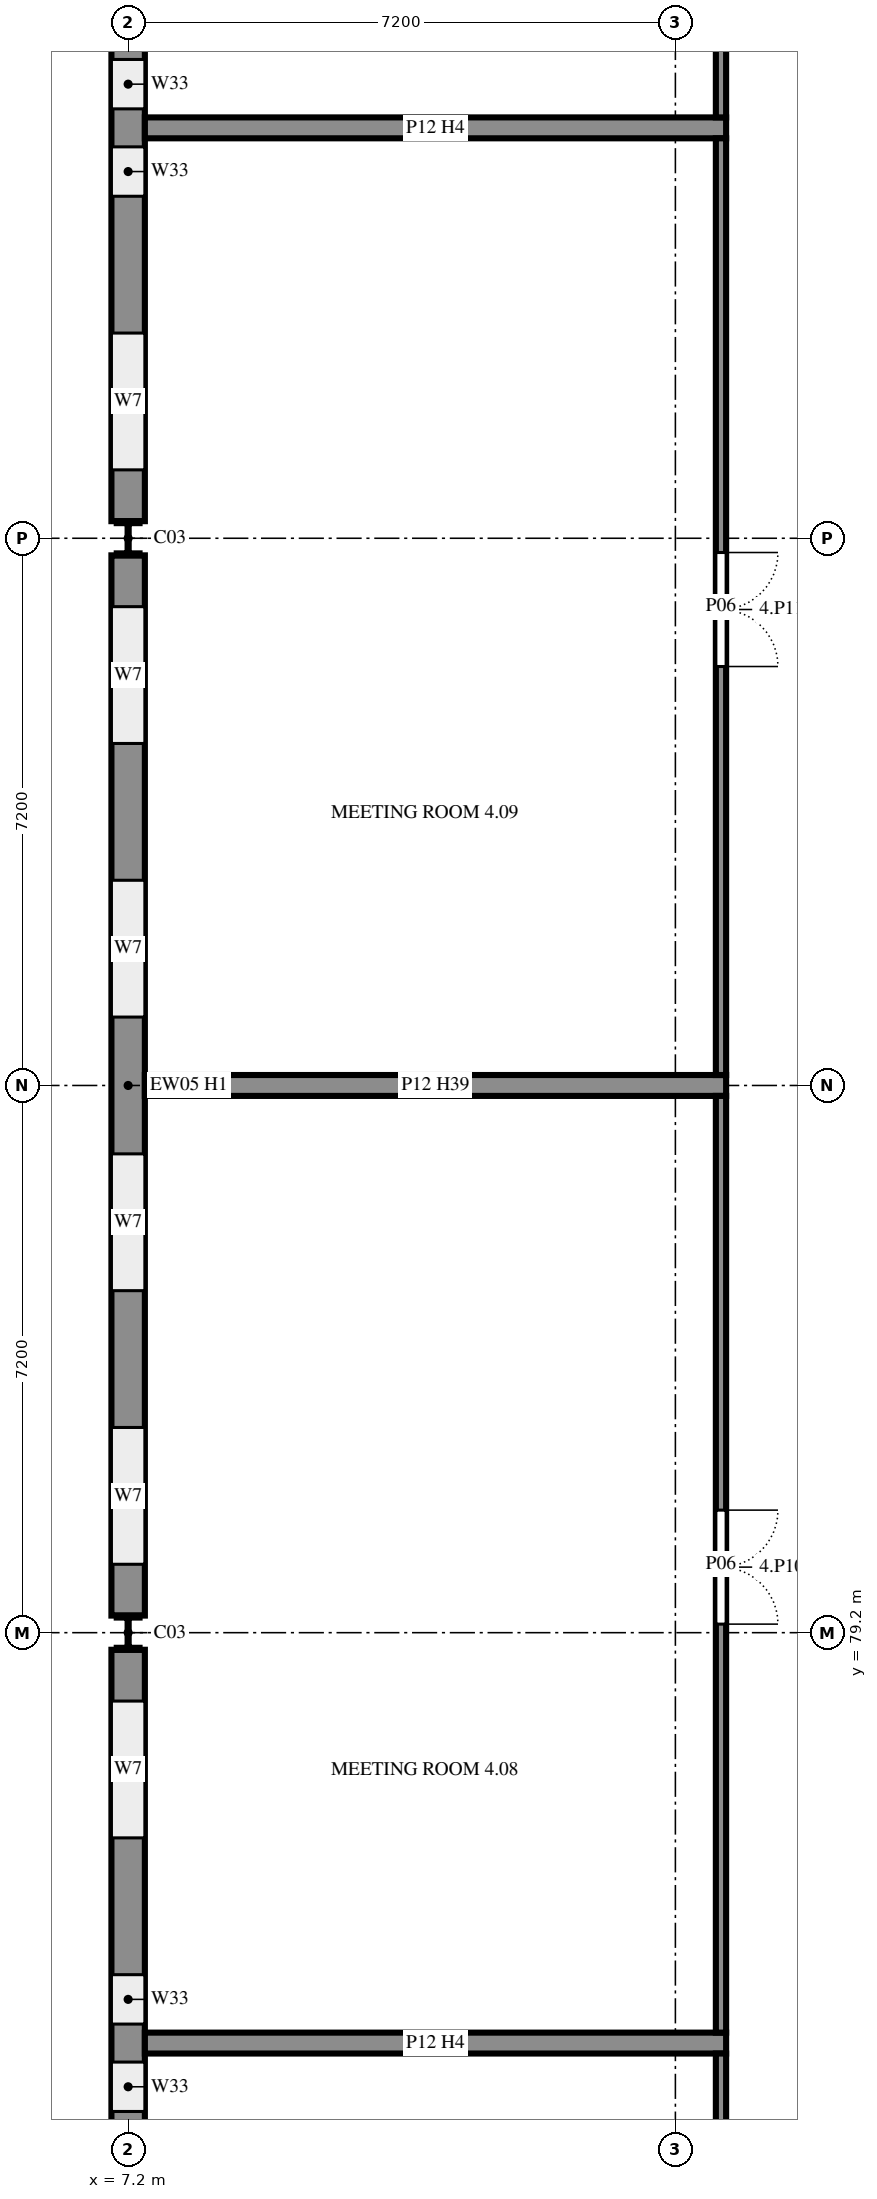
"""IFC4 building model, lengths in metres.
Left out: names, types, materials, properties, quantities, classifications, styles, units other than length and angle.
Written with IfcOpenShell. Run it as: python <this file> out.ifc"""

import sys

from ifc_helpers import new_model, si_unit, direction, frame, frame_2d, origin, origin_2d, place, context, subcontext, project, spatial, rectangle, i_section, extrude, element, fill, save


model = new_model("IFC4")
c1 = context("Model", 3, precision=1e-05, world=origin(), true_north=direction((0.0, 1.0)))
c2 = subcontext(c1, "Body", "Model", "MODEL_VIEW")
j1 = project(units=[si_unit("LENGTHUNIT", "METRE"), si_unit("PLANEANGLEUNIT", "RADIAN")], contexts=[c1])
p1 = place(None, origin())
s1 = spatial("IfcSite", under=j1, at=p1, CompositionType="ELEMENT")
p2 = place(p1, origin())
s2 = spatial("IfcBuilding", under=s1, at=p2, CompositionType="ELEMENT")
p3 = place(p2, frame((0.0, 0.0, 14.4)))
s3 = spatial("IfcBuildingStorey", under=s2, at=p3, CompositionType="ELEMENT", Elevation=14.4)
for number, where, z_axis, x_axis in (
    (1, (7.2, 79.2, 0.0), (0.0, 0.0, 1.0), (1.0, 0.0, 0.0)),
    (2, (7.2, 93.6, 0.0), (0.0, 0.0, 1.0), (1.0, 0.0, 0.0)),
):
    element("IfcColumn", number, at=place(p3, frame(where, z_axis=z_axis, x_axis=x_axis)), inside=s3, PredefinedType="COLUMN", context=c2, shape_type="SweptSolid", body=[
        extrude(i_section(OverallWidth=0.3, OverallDepth=0.45, WebThickness=0.014, FlangeThickness=0.026, FilletRadius=0.027, at=origin_2d()), origin(), (0.0, 0.0, 1.0), 3.6),
    ])
p4 = place(p3, frame((7.2, 107.775, 0.0), z_axis=(0.0, 0.0, 1.0), x_axis=(0.0, -1.0, 0.0)))
e3 = element("IfcWall", 3, at=p4, inside=s3, PredefinedType="SOLIDWALL", context=c2, shape_type="SweptSolid", body=[
    extrude(rectangle(XDim=13.95, YDim=0.44, at=frame_2d((6.975, 0.0))), origin(), (0.0, 0.0, 1.0), 2.82),
])
p5 = place(p4, frame((11.475, 0.0, 0.75)))
e4 = element("IfcOpeningElement", 4, at=p5, cuts=e3, PredefinedType="OPENING", context=c2, shape_type="SweptSolid", body=[
    extrude(rectangle(XDim=1.8, YDim=1.8, at=frame_2d((0.9, 0.9))), frame((0.0, 0.23, 0.0), z_axis=(0.0, -1.0, 0.0), x_axis=(1.0, 0.0, 0.0)), (0.0, 0.0, 1.0), 0.46),
])
p6 = place(p4, frame((7.875, 0.0, 0.75)))
e5 = element("IfcOpeningElement", 5, at=p6, cuts=e3, PredefinedType="OPENING", context=c2, shape_type="SweptSolid", body=[
    extrude(rectangle(XDim=0.65, YDim=1.8, at=frame_2d((0.325, 0.9))), frame((0.0, 0.23, 0.0), z_axis=(0.0, -1.0, 0.0), x_axis=(1.0, 0.0, 0.0)), (0.0, 0.0, 1.0), 0.46),
])
p7 = place(p4, frame((9.025, 0.0, 0.75)))
e6 = element("IfcOpeningElement", 6, at=p7, cuts=e3, PredefinedType="OPENING", context=c2, shape_type="SweptSolid", body=[
    extrude(rectangle(XDim=0.65, YDim=1.8, at=frame_2d((0.325, 0.9))), frame((0.0, 0.23, 0.0), z_axis=(0.0, -1.0, 0.0), x_axis=(1.0, 0.0, 0.0)), (0.0, 0.0, 1.0), 0.46),
])
p8 = place(p4, frame((4.275, 0.0, 0.75)))
e7 = element("IfcOpeningElement", 7, at=p8, cuts=e3, PredefinedType="OPENING", context=c2, shape_type="SweptSolid", body=[
    extrude(rectangle(XDim=1.8, YDim=1.8, at=frame_2d((0.9, 0.9))), frame((0.0, 0.23, 0.0), z_axis=(0.0, -1.0, 0.0), x_axis=(1.0, 0.0, 0.0)), (0.0, 0.0, 1.0), 0.46),
])
p9 = place(p4, frame((0.675, 0.0, 0.75)))
e8 = element("IfcOpeningElement", 8, at=p9, cuts=e3, PredefinedType="OPENING", context=c2, shape_type="SweptSolid", body=[
    extrude(rectangle(XDim=1.8, YDim=1.8, at=frame_2d((0.9, 0.9))), frame((0.0, 0.23, 0.0), z_axis=(0.0, -1.0, 0.0), x_axis=(1.0, 0.0, 0.0)), (0.0, 0.0, 1.0), 0.46),
])
p10 = place(p3, frame((7.2, 93.375, 0.0), z_axis=(0.0, 0.0, 1.0), x_axis=(0.0, -1.0, 0.0)))
e9 = element("IfcWall", 9, at=p10, inside=s3, PredefinedType="SOLIDWALL", context=c2, shape_type="SweptSolid", body=[
    extrude(rectangle(XDim=13.95, YDim=0.44, at=frame_2d((6.975, 0.0))), origin(), (0.0, 0.0, 1.0), 2.82),
])
p11 = place(p10, frame((11.475, 0.0, 0.75)))
e10 = element("IfcOpeningElement", 10, at=p11, cuts=e9, PredefinedType="OPENING", context=c2, shape_type="SweptSolid", body=[
    extrude(rectangle(XDim=1.8, YDim=1.8, at=frame_2d((0.9, 0.9))), frame((0.0, 0.23, 0.0), z_axis=(0.0, -1.0, 0.0), x_axis=(1.0, 0.0, 0.0)), (0.0, 0.0, 1.0), 0.46),
])
p12 = place(p10, frame((7.875, 0.0, 0.75)))
e11 = element("IfcOpeningElement", 11, at=p12, cuts=e9, PredefinedType="OPENING", context=c2, shape_type="SweptSolid", body=[
    extrude(rectangle(XDim=1.8, YDim=1.8, at=frame_2d((0.9, 0.9))), frame((0.0, 0.23, 0.0), z_axis=(0.0, -1.0, 0.0), x_axis=(1.0, 0.0, 0.0)), (0.0, 0.0, 1.0), 0.46),
])
p13 = place(p10, frame((4.275, 0.0, 0.75)))
e12 = element("IfcOpeningElement", 12, at=p13, cuts=e9, PredefinedType="OPENING", context=c2, shape_type="SweptSolid", body=[
    extrude(rectangle(XDim=1.8, YDim=1.8, at=frame_2d((0.9, 0.9))), frame((0.0, 0.23, 0.0), z_axis=(0.0, -1.0, 0.0), x_axis=(1.0, 0.0, 0.0)), (0.0, 0.0, 1.0), 0.46),
])
p14 = place(p10, frame((0.675, 0.0, 0.75)))
e13 = element("IfcOpeningElement", 13, at=p14, cuts=e9, PredefinedType="OPENING", context=c2, shape_type="SweptSolid", body=[
    extrude(rectangle(XDim=1.8, YDim=1.8, at=frame_2d((0.9, 0.9))), frame((0.0, 0.23, 0.0), z_axis=(0.0, -1.0, 0.0), x_axis=(1.0, 0.0, 0.0)), (0.0, 0.0, 1.0), 0.46),
])
p15 = place(p3, frame((7.2, 78.975, 0.0), z_axis=(0.0, 0.0, 1.0), x_axis=(0.0, -1.0, 0.0)))
e14 = element("IfcWall", 14, at=p15, inside=s3, PredefinedType="SOLIDWALL", context=c2, shape_type="SweptSolid", body=[
    extrude(rectangle(XDim=13.95, YDim=0.44, at=frame_2d((6.975, 0.0))), origin(), (0.0, 0.0, 1.0), 2.82),
])
p16 = place(p15, frame((11.475, 0.0, 0.75)))
e15 = element("IfcOpeningElement", 15, at=p16, cuts=e14, PredefinedType="OPENING", context=c2, shape_type="SweptSolid", body=[
    extrude(rectangle(XDim=1.8, YDim=1.8, at=frame_2d((0.9, 0.9))), frame((0.0, 0.23, 0.0), z_axis=(0.0, -1.0, 0.0), x_axis=(1.0, 0.0, 0.0)), (0.0, 0.0, 1.0), 0.46),
])
p17 = place(p15, frame((7.875, 0.0, 0.75)))
e16 = element("IfcOpeningElement", 16, at=p17, cuts=e14, PredefinedType="OPENING", context=c2, shape_type="SweptSolid", body=[
    extrude(rectangle(XDim=1.8, YDim=1.8, at=frame_2d((0.9, 0.9))), frame((0.0, 0.23, 0.0), z_axis=(0.0, -1.0, 0.0), x_axis=(1.0, 0.0, 0.0)), (0.0, 0.0, 1.0), 0.46),
])
p18 = place(p15, frame((4.275, 0.0, 0.75)))
e17 = element("IfcOpeningElement", 17, at=p18, cuts=e14, PredefinedType="OPENING", context=c2, shape_type="SweptSolid", body=[
    extrude(rectangle(XDim=0.65, YDim=1.8, at=frame_2d((0.325, 0.9))), frame((0.0, 0.23, 0.0), z_axis=(0.0, -1.0, 0.0), x_axis=(1.0, 0.0, 0.0)), (0.0, 0.0, 1.0), 0.46),
])
p19 = place(p15, frame((5.425, 0.0, 0.75)))
e18 = element("IfcOpeningElement", 18, at=p19, cuts=e14, PredefinedType="OPENING", context=c2, shape_type="SweptSolid", body=[
    extrude(rectangle(XDim=0.65, YDim=1.8, at=frame_2d((0.325, 0.9))), frame((0.0, 0.23, 0.0), z_axis=(0.0, -1.0, 0.0), x_axis=(1.0, 0.0, 0.0)), (0.0, 0.0, 1.0), 0.46),
])
p20 = place(p15, frame((0.675, 0.0, 0.75)))
e19 = element("IfcOpeningElement", 19, at=p20, cuts=e14, PredefinedType="OPENING", context=c2, shape_type="SweptSolid", body=[
    extrude(rectangle(XDim=1.8, YDim=1.8, at=frame_2d((0.9, 0.9))), frame((0.0, 0.23, 0.0), z_axis=(0.0, -1.0, 0.0), x_axis=(1.0, 0.0, 0.0)), (0.0, 0.0, 1.0), 0.46),
])
p21 = place(p3, frame((7.42, 73.8, 0.0), z_axis=(0.0, 0.0, 1.0), x_axis=(1.0, 0.0, 0.0)))
e20 = element("IfcWall", 20, at=p21, inside=s3, PredefinedType="PARTITIONING", context=c2, shape_type="SweptSolid", body=[
    extrude(rectangle(XDim=7.647, YDim=0.275, at=frame_2d((3.824, 0.0))), origin(), (0.0, 0.0, 1.0), 3.42),
])
p22 = place(p3, frame((15.0, 73.663, 0.0), z_axis=(0.0, 0.0, 1.0), x_axis=(0.0, -1.0, 0.0)))
e21 = element("IfcWall", 21, at=p22, inside=s3, PredefinedType="PARTITIONING", context=c2, shape_type="SweptSolid", body=[
    extrude(rectangle(XDim=8.795, YDim=0.135, at=frame_2d((4.397, 0.0))), origin(), (0.0, 0.0, 1.0), 3.42),
])
p23 = place(p22, frame((3.65, 0.0, 0.0)))
e22 = element("IfcOpeningElement", 22, at=p23, cuts=e21, PredefinedType="OPENING", context=c2, shape_type="SweptSolid", body=[
    extrude(rectangle(XDim=1.5, YDim=2.1, at=frame_2d((0.75, 1.05))), frame((0.0, 0.077, 0.0), z_axis=(0.0, -1.0, 0.0), x_axis=(1.0, 0.0, 0.0)), (0.0, 0.0, 1.0), 0.155),
])
p24 = place(p3, frame((7.42, 86.4, 0.0), z_axis=(0.0, 0.0, 1.0), x_axis=(1.0, 0.0, 0.0)))
e23 = element("IfcWall", 23, at=p24, inside=s3, PredefinedType="PARTITIONING", context=c2, shape_type="SweptSolid", body=[
    extrude(rectangle(XDim=7.647, YDim=0.275, at=frame_2d((3.824, 0.0))), origin(), (0.0, 0.0, 1.0), 2.969),
])
p25 = place(p3, frame((15.0, 86.262, 0.0), z_axis=(0.0, 0.0, 1.0), x_axis=(0.0, -1.0, 0.0)))
e24 = element("IfcWall", 24, at=p25, inside=s3, PredefinedType="PARTITIONING", context=c2, shape_type="SweptSolid", body=[
    extrude(rectangle(XDim=12.325, YDim=0.135, at=frame_2d((6.163, 0.0))), origin(), (0.0, 0.0, 1.0), 3.42),
])
p26 = place(p25, frame((5.45, 0.0, 0.0)))
e25 = element("IfcOpeningElement", 25, at=p26, cuts=e24, PredefinedType="OPENING", context=c2, shape_type="SweptSolid", body=[
    extrude(rectangle(XDim=1.5, YDim=2.1, at=frame_2d((0.75, 1.05))), frame((0.0, 0.077, 0.0), z_axis=(0.0, -1.0, 0.0), x_axis=(1.0, 0.0, 0.0)), (0.0, 0.0, 1.0), 0.155),
])
p27 = place(p3, frame((7.42, 99.0, 0.0), z_axis=(0.0, 0.0, 1.0), x_axis=(1.0, 0.0, 0.0)))
e26 = element("IfcWall", 26, at=p27, inside=s3, PredefinedType="PARTITIONING", context=c2, shape_type="SweptSolid", body=[
    extrude(rectangle(XDim=7.647, YDim=0.275, at=frame_2d((3.824, 0.0))), origin(), (0.0, 0.0, 1.0), 3.42),
])
p28 = place(p3, frame((15.0, 98.863, 0.0), z_axis=(0.0, 0.0, 1.0), x_axis=(0.0, -1.0, 0.0)))
e27 = element("IfcWall", 27, at=p28, inside=s3, PredefinedType="PARTITIONING", context=c2, shape_type="SweptSolid", body=[
    extrude(rectangle(XDim=12.325, YDim=0.135, at=frame_2d((6.163, 0.0))), origin(), (0.0, 0.0, 1.0), 3.42),
])
p29 = place(p28, frame((5.45, 0.0, 0.0)))
e28 = element("IfcOpeningElement", 28, at=p29, cuts=e27, PredefinedType="OPENING", context=c2, shape_type="SweptSolid", body=[
    extrude(rectangle(XDim=1.5, YDim=2.1, at=frame_2d((0.75, 1.05))), frame((0.0, 0.077, 0.0), z_axis=(0.0, -1.0, 0.0), x_axis=(1.0, 0.0, 0.0)), (0.0, 0.0, 1.0), 0.155),
])
p30 = place(p3, frame((15.0, 107.933, 0.0), z_axis=(0.0, 0.0, 1.0), x_axis=(0.0, -1.0, 0.0)))
e29 = element("IfcWall", 29, at=p30, inside=s3, PredefinedType="PARTITIONING", context=c2, shape_type="SweptSolid", body=[
    extrude(rectangle(XDim=8.795, YDim=0.135, at=frame_2d((4.397, 0.0))), origin(), (0.0, 0.0, 1.0), 3.42),
])
p31 = place(p30, frame((3.65, 0.0, 0.0)))
e30 = element("IfcOpeningElement", 30, at=p31, cuts=e29, PredefinedType="OPENING", context=c2, shape_type="SweptSolid", body=[
    extrude(rectangle(XDim=1.5, YDim=2.1, at=frame_2d((0.75, 1.05))), frame((0.0, 0.077, 0.0), z_axis=(0.0, -1.0, 0.0), x_axis=(1.0, 0.0, 0.0)), (0.0, 0.0, 1.0), 0.155),
])
p32 = place(p5, origin())
e31 = element("IfcWindow", 31, at=p32, inside=s3, PartitioningType="SINGLE_PANEL", PredefinedType="WINDOW", context=c2, shape_type="SweptSolid", body=[
    extrude(rectangle(XDim=1.8, YDim=1.8, at=frame_2d((0.9, 0.9))), frame((0.0, 0.03, 0.0), z_axis=(0.0, -1.0, 0.0), x_axis=(1.0, 0.0, 0.0)), (0.0, 0.0, 1.0), 0.06),
])
fill(e4, e31)
p33 = place(p6, origin())
e32 = element("IfcWindow", 32, at=p33, inside=s3, PartitioningType="SINGLE_PANEL", PredefinedType="WINDOW", context=c2, shape_type="SweptSolid", body=[
    extrude(rectangle(XDim=0.65, YDim=1.8, at=frame_2d((0.325, 0.9))), frame((0.0, 0.03, 0.0), z_axis=(0.0, -1.0, 0.0), x_axis=(1.0, 0.0, 0.0)), (0.0, 0.0, 1.0), 0.06),
])
fill(e5, e32)
p34 = place(p7, origin())
e33 = element("IfcWindow", 33, at=p34, inside=s3, PartitioningType="SINGLE_PANEL", PredefinedType="WINDOW", context=c2, shape_type="SweptSolid", body=[
    extrude(rectangle(XDim=0.65, YDim=1.8, at=frame_2d((0.325, 0.9))), frame((0.0, 0.03, 0.0), z_axis=(0.0, -1.0, 0.0), x_axis=(1.0, 0.0, 0.0)), (0.0, 0.0, 1.0), 0.06),
])
fill(e6, e33)
p35 = place(p11, origin())
e34 = element("IfcWindow", 34, at=p35, inside=s3, PartitioningType="SINGLE_PANEL", PredefinedType="WINDOW", context=c2, shape_type="SweptSolid", body=[
    extrude(rectangle(XDim=1.8, YDim=1.8, at=frame_2d((0.9, 0.9))), frame((0.0, 0.03, 0.0), z_axis=(0.0, -1.0, 0.0), x_axis=(1.0, 0.0, 0.0)), (0.0, 0.0, 1.0), 0.06),
])
fill(e10, e34)
p36 = place(p12, origin())
e35 = element("IfcWindow", 35, at=p36, inside=s3, PartitioningType="SINGLE_PANEL", PredefinedType="WINDOW", context=c2, shape_type="SweptSolid", body=[
    extrude(rectangle(XDim=1.8, YDim=1.8, at=frame_2d((0.9, 0.9))), frame((0.0, 0.03, 0.0), z_axis=(0.0, -1.0, 0.0), x_axis=(1.0, 0.0, 0.0)), (0.0, 0.0, 1.0), 0.06),
])
fill(e11, e35)
p37 = place(p13, origin())
e36 = element("IfcWindow", 36, at=p37, inside=s3, PartitioningType="SINGLE_PANEL", PredefinedType="WINDOW", context=c2, shape_type="SweptSolid", body=[
    extrude(rectangle(XDim=1.8, YDim=1.8, at=frame_2d((0.9, 0.9))), frame((0.0, 0.03, 0.0), z_axis=(0.0, -1.0, 0.0), x_axis=(1.0, 0.0, 0.0)), (0.0, 0.0, 1.0), 0.06),
])
fill(e12, e36)
p38 = place(p14, origin())
e37 = element("IfcWindow", 37, at=p38, inside=s3, PartitioningType="SINGLE_PANEL", PredefinedType="WINDOW", context=c2, shape_type="SweptSolid", body=[
    extrude(rectangle(XDim=1.8, YDim=1.8, at=frame_2d((0.9, 0.9))), frame((0.0, 0.03, 0.0), z_axis=(0.0, -1.0, 0.0), x_axis=(1.0, 0.0, 0.0)), (0.0, 0.0, 1.0), 0.06),
])
fill(e13, e37)
p39 = place(p18, origin())
e38 = element("IfcWindow", 38, at=p39, inside=s3, PartitioningType="SINGLE_PANEL", PredefinedType="WINDOW", context=c2, shape_type="SweptSolid", body=[
    extrude(rectangle(XDim=0.65, YDim=1.8, at=frame_2d((0.325, 0.9))), frame((0.0, 0.03, 0.0), z_axis=(0.0, -1.0, 0.0), x_axis=(1.0, 0.0, 0.0)), (0.0, 0.0, 1.0), 0.06),
])
fill(e17, e38)
p40 = place(p19, origin())
e39 = element("IfcWindow", 39, at=p40, inside=s3, PartitioningType="SINGLE_PANEL", PredefinedType="WINDOW", context=c2, shape_type="SweptSolid", body=[
    extrude(rectangle(XDim=0.65, YDim=1.8, at=frame_2d((0.325, 0.9))), frame((0.0, 0.03, 0.0), z_axis=(0.0, -1.0, 0.0), x_axis=(1.0, 0.0, 0.0)), (0.0, 0.0, 1.0), 0.06),
])
fill(e18, e39)
p41 = place(p20, origin())
e40 = element("IfcWindow", 40, at=p41, inside=s3, PartitioningType="SINGLE_PANEL", PredefinedType="WINDOW", context=c2, shape_type="SweptSolid", body=[
    extrude(rectangle(XDim=1.8, YDim=1.8, at=frame_2d((0.9, 0.9))), frame((0.0, 0.03, 0.0), z_axis=(0.0, -1.0, 0.0), x_axis=(1.0, 0.0, 0.0)), (0.0, 0.0, 1.0), 0.06),
])
fill(e19, e40)
p42 = place(p26, origin())
e41 = element("IfcDoor", 41, at=p42, inside=s3, OperationType="DOUBLE_DOOR_SINGLE_SWING", PredefinedType="DOOR", context=c2, shape_type="SweptSolid", body=[
    extrude(rectangle(XDim=1.5, YDim=2.1, at=frame_2d((0.75, 1.05))), frame((0.0, 0.025, 0.0), z_axis=(0.0, -1.0, 0.0), x_axis=(1.0, 0.0, 0.0)), (0.0, 0.0, 1.0), 0.05),
])
fill(e25, e41)
p43 = place(p29, origin())
e42 = element("IfcDoor", 42, at=p43, inside=s3, OperationType="DOUBLE_DOOR_SINGLE_SWING", PredefinedType="DOOR", context=c2, shape_type="SweptSolid", body=[
    extrude(rectangle(XDim=1.5, YDim=2.1, at=frame_2d((0.75, 1.05))), frame((0.0, 0.025, 0.0), z_axis=(0.0, -1.0, 0.0), x_axis=(1.0, 0.0, 0.0)), (0.0, 0.0, 1.0), 0.05),
])
fill(e28, e42)
save(model, sys.argv[1])
